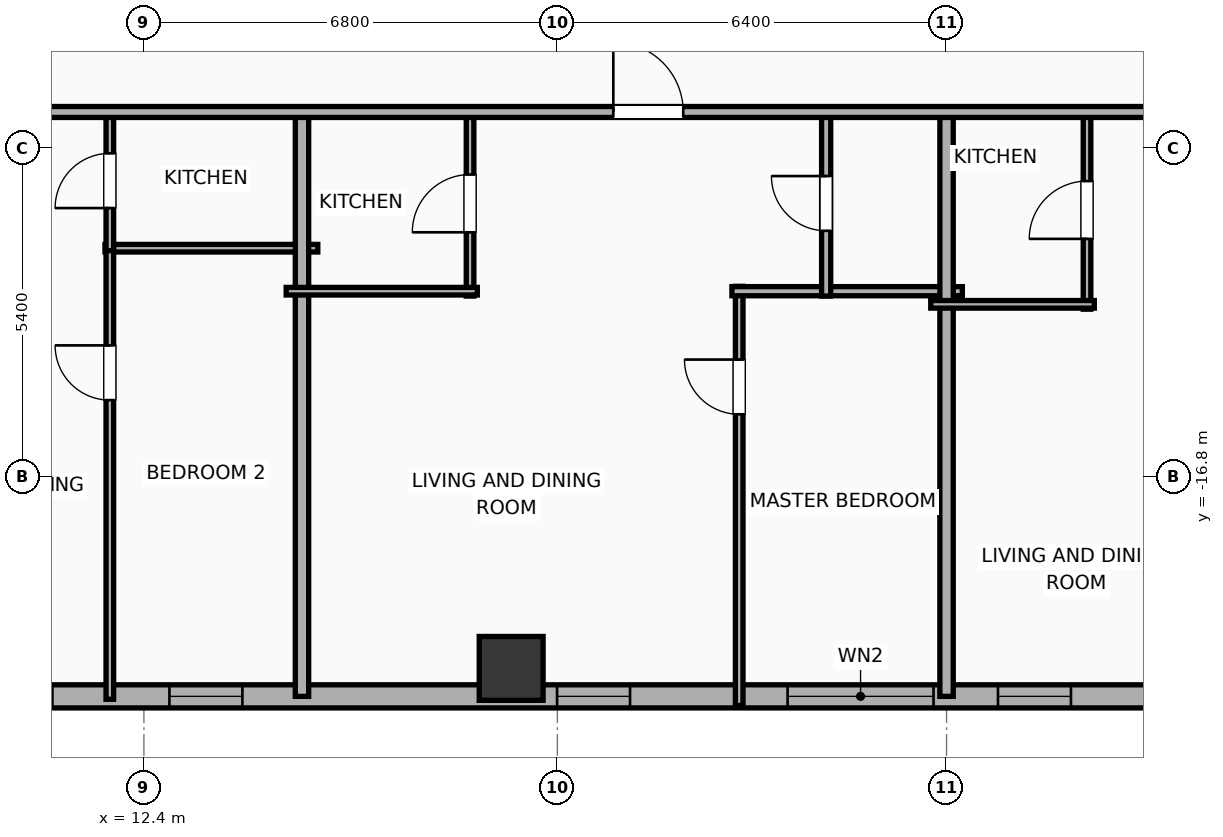
"""IFC4 building model, lengths in metres.
Left out: names, types, materials, properties, quantities, classifications, styles, units other than length and angle.
Written with IfcOpenShell. Run it as: python <this file> out.ifc"""

import sys

from ifc_helpers import new_model, si_unit, direction, frame, frame_2d, origin, origin_2d, place, context, subcontext, project, spatial, rectangle, hollow_rectangle, extrude, element, fill, save


model = new_model("IFC4")
c1 = context("Model", 3, precision=1e-05, world=origin(), true_north=direction((0.0, 1.0)))
c2 = subcontext(c1, "Body", "Model", "MODEL_VIEW")
j1 = project(units=[si_unit("LENGTHUNIT", "METRE"), si_unit("PLANEANGLEUNIT", "RADIAN")], contexts=[c1])
p1 = place(None, origin())
s1 = spatial("IfcSite", under=j1, at=p1, CompositionType="ELEMENT")
p2 = place(p1, origin())
s2 = spatial("IfcBuilding", under=s1, at=p2, CompositionType="ELEMENT")
p3 = place(p2, frame((0.0, 0.0, 132.6)))
s3 = spatial("IfcBuildingStorey", under=s2, at=p3, CompositionType="ELEMENT", Elevation=132.6)
p4 = place(p3, frame((18.44, -19.95, 0.0), z_axis=(0.0, 0.0, 1.0), x_axis=(1.0, 0.0, 0.0)))
e1 = element("IfcColumn", 1, at=p4, inside=s3, PredefinedType="COLUMN", context=c2, shape_type="SweptSolid", body=[
    extrude(hollow_rectangle(XDim=1.05, YDim=1.05, WallThickness=0.036, at=origin_2d()), origin(), (0.0, 0.0, 1.0), 3.9),
])
p5 = place(p3, frame((29.381, -20.41, 0.0), z_axis=(0.0, 0.0, 1.0), x_axis=(-1.0, 0.0, 0.0)))
e2 = element("IfcWall", 2, at=p5, inside=s3, PredefinedType="ELEMENTEDWALL", context=c2, shape_type="SweptSolid", body=[
    extrude(rectangle(XDim=54.763, YDim=0.38, at=frame_2d((27.381, 0.0))), origin(), (0.0, 0.0, 1.0), 3.65),
])
p6 = place(p5, frame((3.995, 0.0, 0.75)))
e3 = element("IfcOpeningElement", 3, at=p6, cuts=e2, PredefinedType="OPENING", context=c2, shape_type="SweptSolid", body=[
    extrude(rectangle(XDim=2.4, YDim=2.1, at=frame_2d((1.2, 1.05))), frame((0.0, 0.2, 0.0), z_axis=(0.0, -1.0, 0.0), x_axis=(1.0, 0.0, 0.0)), (0.0, 0.0, 1.0), 0.4),
])
p7 = place(p5, frame((18.486, 0.0, 0.75)))
e4 = element("IfcOpeningElement", 4, at=p7, cuts=e2, PredefinedType="OPENING", context=c2, shape_type="SweptSolid", body=[
    extrude(rectangle(XDim=2.4, YDim=2.1, at=frame_2d((1.2, 1.05))), frame((0.0, 0.2, 0.0), z_axis=(0.0, -1.0, 0.0), x_axis=(1.0, 0.0, 0.0)), (0.0, 0.0, 1.0), 0.4),
])
p8 = place(p5, frame((46.717, 0.0, 0.75)))
e5 = element("IfcOpeningElement", 5, at=p8, cuts=e2, PredefinedType="OPENING", context=c2, shape_type="SweptSolid", body=[
    extrude(rectangle(XDim=2.4, YDim=2.1, at=frame_2d((1.2, 1.05))), frame((0.0, 0.2, 0.0), z_axis=(0.0, -1.0, 0.0), x_axis=(1.0, 0.0, 0.0)), (0.0, 0.0, 1.0), 0.4),
])
p9 = place(p5, frame((52.651, 0.0, 0.75)))
e6 = element("IfcOpeningElement", 6, at=p9, cuts=e2, PredefinedType="OPENING", context=c2, shape_type="SweptSolid", body=[
    extrude(rectangle(XDim=1.2, YDim=2.05, at=frame_2d((0.6, 1.025))), frame((0.0, 0.2, 0.0), z_axis=(0.0, -1.0, 0.0), x_axis=(1.0, 0.0, 0.0)), (0.0, 0.0, 1.0), 0.4),
])
p10 = place(p5, frame((50.521, 0.0, 0.75)))
e7 = element("IfcOpeningElement", 7, at=p10, cuts=e2, PredefinedType="OPENING", context=c2, shape_type="SweptSolid", body=[
    extrude(rectangle(XDim=1.2, YDim=2.05, at=frame_2d((0.6, 1.025))), frame((0.0, 0.2, 0.0), z_axis=(0.0, -1.0, 0.0), x_axis=(1.0, 0.0, 0.0)), (0.0, 0.0, 1.0), 0.4),
])
p11 = place(p5, frame((40.191, 0.0, 0.75)))
e8 = element("IfcOpeningElement", 8, at=p11, cuts=e2, PredefinedType="OPENING", context=c2, shape_type="SweptSolid", body=[
    extrude(rectangle(XDim=1.2, YDim=2.05, at=frame_2d((0.6, 1.025))), frame((0.0, 0.2, 0.0), z_axis=(0.0, -1.0, 0.0), x_axis=(1.0, 0.0, 0.0)), (0.0, 0.0, 1.0), 0.4),
])
p12 = place(p5, frame((44.631, 0.0, 0.75)))
e9 = element("IfcOpeningElement", 9, at=p12, cuts=e2, PredefinedType="OPENING", context=c2, shape_type="SweptSolid", body=[
    extrude(rectangle(XDim=1.2, YDim=2.05, at=frame_2d((0.6, 1.025))), frame((0.0, 0.2, 0.0), z_axis=(0.0, -1.0, 0.0), x_axis=(1.0, 0.0, 0.0)), (0.0, 0.0, 1.0), 0.4),
])
p13 = place(p5, frame((36.561, 0.0, 0.75)))
e10 = element("IfcOpeningElement", 10, at=p13, cuts=e2, PredefinedType="OPENING", context=c2, shape_type="SweptSolid", body=[
    extrude(rectangle(XDim=1.2, YDim=2.05, at=frame_2d((0.6, 1.025))), frame((0.0, 0.2, 0.0), z_axis=(0.0, -1.0, 0.0), x_axis=(1.0, 0.0, 0.0)), (0.0, 0.0, 1.0), 0.4),
])
p14 = place(p5, frame((30.004, 0.0, 0.75)))
e11 = element("IfcOpeningElement", 11, at=p14, cuts=e2, PredefinedType="OPENING", context=c2, shape_type="SweptSolid", body=[
    extrude(rectangle(XDim=1.2, YDim=2.05, at=frame_2d((0.6, 1.025))), frame((0.0, 0.2, 0.0), z_axis=(0.0, -1.0, 0.0), x_axis=(1.0, 0.0, 0.0)), (0.0, 0.0, 1.0), 0.4),
])
p15 = place(p5, frame((33.599, 0.0, 0.75)))
e12 = element("IfcOpeningElement", 12, at=p15, cuts=e2, PredefinedType="OPENING", context=c2, shape_type="SweptSolid", body=[
    extrude(rectangle(XDim=1.2, YDim=2.05, at=frame_2d((0.6, 1.025))), frame((0.0, 0.2, 0.0), z_axis=(0.0, -1.0, 0.0), x_axis=(1.0, 0.0, 0.0)), (0.0, 0.0, 1.0), 0.4),
])
p16 = place(p5, frame((26.086, 0.0, 0.75)))
e13 = element("IfcOpeningElement", 13, at=p16, cuts=e2, PredefinedType="OPENING", context=c2, shape_type="SweptSolid", body=[
    extrude(rectangle(XDim=1.2, YDim=2.05, at=frame_2d((0.6, 1.025))), frame((0.0, 0.2, 0.0), z_axis=(0.0, -1.0, 0.0), x_axis=(1.0, 0.0, 0.0)), (0.0, 0.0, 1.0), 0.4),
])
p17 = place(p5, frame((22.626, 0.0, 0.75)))
e14 = element("IfcOpeningElement", 14, at=p17, cuts=e2, PredefinedType="OPENING", context=c2, shape_type="SweptSolid", body=[
    extrude(rectangle(XDim=1.2, YDim=2.05, at=frame_2d((0.6, 1.025))), frame((0.0, 0.2, 0.0), z_axis=(0.0, -1.0, 0.0), x_axis=(1.0, 0.0, 0.0)), (0.0, 0.0, 1.0), 0.4),
])
p18 = place(p5, frame((15.361, 0.0, 0.75)))
e15 = element("IfcOpeningElement", 15, at=p18, cuts=e2, PredefinedType="OPENING", context=c2, shape_type="SweptSolid", body=[
    extrude(rectangle(XDim=1.2, YDim=2.05, at=frame_2d((0.6, 1.025))), frame((0.0, 0.2, 0.0), z_axis=(0.0, -1.0, 0.0), x_axis=(1.0, 0.0, 0.0)), (0.0, 0.0, 1.0), 0.4),
])
p19 = place(p5, frame((8.986, 0.0, 0.75)))
e16 = element("IfcOpeningElement", 16, at=p19, cuts=e2, PredefinedType="OPENING", context=c2, shape_type="SweptSolid", body=[
    extrude(rectangle(XDim=1.2, YDim=2.05, at=frame_2d((0.6, 1.025))), frame((0.0, 0.2, 0.0), z_axis=(0.0, -1.0, 0.0), x_axis=(1.0, 0.0, 0.0)), (0.0, 0.0, 1.0), 0.4),
])
p20 = place(p5, frame((1.736, 0.0, 0.75)))
e17 = element("IfcOpeningElement", 17, at=p20, cuts=e2, PredefinedType="OPENING", context=c2, shape_type="SweptSolid", body=[
    extrude(rectangle(XDim=1.2, YDim=2.05, at=frame_2d((0.6, 1.025))), frame((0.0, 0.2, 0.0), z_axis=(0.0, -1.0, 0.0), x_axis=(1.0, 0.0, 0.0)), (0.0, 0.0, 1.0), 0.4),
])
p21 = place(p3, frame((11.76, -13.04, 0.0), z_axis=(0.0, 0.0, 1.0), x_axis=(1.0, 0.0, 0.0)))
e18 = element("IfcWall", 18, at=p21, inside=s3, PredefinedType="PARTITIONING", context=c2, shape_type="SweptSolid", body=[
    extrude(rectangle(XDim=3.5, YDim=0.125, at=frame_2d((1.75, 0.0))), origin(), (0.0, 0.0, 1.0), 3.65),
])
p22 = place(p3, frame((11.84, -20.458, 0.0), z_axis=(0.0, 0.0, 1.0), x_axis=(0.0, 1.0, 0.0)))
e19 = element("IfcWall", 19, at=p22, inside=s3, PredefinedType="PARTITIONING", context=c2, shape_type="SweptSolid", body=[
    extrude(rectangle(XDim=7.458, YDim=0.125, at=frame_2d((3.729, 0.0))), origin(), (0.0, 0.0, 1.0), 3.65),
])
p23 = place(p22, frame((4.919, 0.0, 0.0)))
e20 = element("IfcOpeningElement", 20, at=p23, cuts=e19, PredefinedType="OPENING", context=c2, shape_type="SweptSolid", body=[
    extrude(rectangle(XDim=0.9, YDim=2.05, at=frame_2d((0.45, 1.025))), frame((0.0, 0.073, 0.0), z_axis=(0.0, -1.0, 0.0), x_axis=(1.0, 0.0, 0.0)), (0.0, 0.0, 1.0), 0.145),
])
p24 = place(p3, frame((11.84, -13.08, 0.0), z_axis=(0.0, 0.0, 1.0), x_axis=(0.0, 1.0, 0.0)))
e21 = element("IfcWall", 21, at=p24, inside=s3, PredefinedType="PARTITIONING", context=c2, shape_type="SweptSolid", body=[
    extrude(rectangle(XDim=2.3, YDim=0.125, at=frame_2d((1.15, 0.0))), origin(), (0.0, 0.0, 1.0), 3.65),
])
p25 = place(p24, frame((0.7, 0.0, 0.0)))
e22 = element("IfcOpeningElement", 22, at=p25, cuts=e21, PredefinedType="OPENING", context=c2, shape_type="SweptSolid", body=[
    extrude(rectangle(XDim=0.9, YDim=2.05, at=frame_2d((0.45, 1.025))), frame((0.0, 0.073, 0.0), z_axis=(0.0, -1.0, 0.0), x_axis=(1.0, 0.0, 0.0)), (0.0, 0.0, 1.0), 0.145),
])
p26 = place(p3, frame((15.0, -20.41, 0.0), z_axis=(0.0, 0.0, 1.0), x_axis=(0.0, 1.0, 0.0)))
e23 = element("IfcWall", 23, at=p26, inside=s3, PredefinedType="PARTITIONING", context=c2, shape_type="SweptSolid", body=[
    extrude(rectangle(XDim=9.69, YDim=0.22, at=frame_2d((4.845, 0.0))), origin(), (0.0, 0.0, 1.0), 3.65),
])
p27 = place(p3, frame((22.19, -20.56, 0.0), z_axis=(0.0, 0.0, 1.0), x_axis=(0.0, 1.0, 0.0)))
e24 = element("IfcWall", 24, at=p27, inside=s3, PredefinedType="PARTITIONING", context=c2, shape_type="SweptSolid", body=[
    extrude(rectangle(XDim=6.893, YDim=0.125, at=frame_2d((3.447, 0.0))), origin(), (0.0, 0.0, 1.0), 3.65),
])
p28 = place(p27, frame((4.789, 0.0, 0.0)))
e25 = element("IfcOpeningElement", 25, at=p28, cuts=e24, PredefinedType="OPENING", context=c2, shape_type="SweptSolid", body=[
    extrude(rectangle(XDim=0.9, YDim=2.05, at=frame_2d((0.45, 1.025))), frame((0.0, 0.073, 0.0), z_axis=(0.0, -1.0, 0.0), x_axis=(1.0, 0.0, 0.0)), (0.0, 0.0, 1.0), 0.145),
])
p29 = place(p3, frame((22.07, -13.747, 0.0), z_axis=(0.0, 0.0, 1.0), x_axis=(1.0, 0.0, 0.0)))
e26 = element("IfcWall", 26, at=p29, inside=s3, PredefinedType="PLUMBINGWALL", context=c2, shape_type="SweptSolid", body=[
    extrude(rectangle(XDim=3.79, YDim=0.15, at=frame_2d((1.895, 0.0))), origin(), (0.0, 0.0, 1.0), 3.65),
])
p30 = place(p3, frame((17.764, -13.827, 0.0), z_axis=(0.0, 0.0, 1.0), x_axis=(0.0, 1.0, 0.0)))
e27 = element("IfcWall", 27, at=p30, inside=s3, PredefinedType="PARTITIONING", context=c2, shape_type="SweptSolid", body=[
    extrude(rectangle(XDim=3.047, YDim=0.125, at=frame_2d((1.523, 0.0))), origin(), (0.0, 0.0, 1.0), 3.65),
])
p31 = place(p30, frame((1.049, 0.0, 0.0)))
e28 = element("IfcOpeningElement", 28, at=p31, cuts=e27, PredefinedType="OPENING", context=c2, shape_type="SweptSolid", body=[
    extrude(rectangle(XDim=0.95, YDim=2.05, at=frame_2d((0.475, 1.025))), frame((0.0, 0.073, 0.0), z_axis=(0.0, -1.0, 0.0), x_axis=(1.0, 0.0, 0.0)), (0.0, 0.0, 1.0), 0.145),
])
p32 = place(p3, frame((14.74, -13.747, 0.0), z_axis=(0.0, 0.0, 1.0), x_axis=(1.0, 0.0, 0.0)))
e29 = element("IfcWall", 29, at=p32, inside=s3, PredefinedType="PARTITIONING", context=c2, shape_type="SweptSolid", body=[
    extrude(rectangle(XDim=3.144, YDim=0.125, at=frame_2d((1.572, 0.0))), origin(), (0.0, 0.0, 1.0), 3.65),
])
p33 = place(p3, frame((23.62, -13.827, 0.0), z_axis=(0.0, 0.0, 1.0), x_axis=(0.0, 1.0, 0.0)))
e30 = element("IfcWall", 30, at=p33, inside=s3, PredefinedType="PLUMBINGWALL", context=c2, shape_type="SweptSolid", body=[
    extrude(rectangle(XDim=3.047, YDim=0.15, at=frame_2d((1.523, 0.0))), origin(), (0.0, 0.0, 1.0), 3.65),
])
p34 = place(p33, frame((1.073, 0.0, 0.0)))
e31 = element("IfcOpeningElement", 31, at=p34, cuts=e30, PredefinedType="OPENING", context=c2, shape_type="SweptSolid", body=[
    extrude(rectangle(XDim=0.9, YDim=2.05, at=frame_2d((0.45, 1.025))), frame((0.0, 0.085, 0.0), z_axis=(0.0, -1.0, 0.0), x_axis=(1.0, 0.0, 0.0)), (0.0, 0.0, 1.0), 0.17),
])
p35 = place(p3, frame((25.6, -20.41, 0.0), z_axis=(0.0, 0.0, 1.0), x_axis=(0.0, 1.0, 0.0)))
e32 = element("IfcWall", 32, at=p35, inside=s3, PredefinedType="PARTITIONING", context=c2, shape_type="SweptSolid", body=[
    extrude(rectangle(XDim=9.69, YDim=0.22, at=frame_2d((4.845, 0.0))), origin(), (0.0, 0.0, 1.0), 3.65),
])
p36 = place(p3, frame((27.91, -14.043, 0.0), z_axis=(0.0, 0.0, 1.0), x_axis=(0.0, 1.0, 0.0)))
e33 = element("IfcWall", 33, at=p36, inside=s3, PredefinedType="PARTITIONING", context=c2, shape_type="SweptSolid", body=[
    extrude(rectangle(XDim=3.263, YDim=0.125, at=frame_2d((1.631, 0.0))), origin(), (0.0, 0.0, 1.0), 3.65),
])
p37 = place(p36, frame((1.156, 0.0, 0.0)))
e34 = element("IfcOpeningElement", 34, at=p37, cuts=e33, PredefinedType="OPENING", context=c2, shape_type="SweptSolid", body=[
    extrude(rectangle(XDim=0.95, YDim=2.05, at=frame_2d((0.475, 1.025))), frame((0.0, 0.073, 0.0), z_axis=(0.0, -1.0, 0.0), x_axis=(1.0, 0.0, 0.0)), (0.0, 0.0, 1.0), 0.145),
])
p38 = place(p3, frame((25.34, -13.963, 0.0), z_axis=(0.0, 0.0, 1.0), x_axis=(1.0, 0.0, 0.0)))
e35 = element("IfcWall", 35, at=p38, inside=s3, PredefinedType="PARTITIONING", context=c2, shape_type="SweptSolid", body=[
    extrude(rectangle(XDim=2.69, YDim=0.125, at=frame_2d((1.345, 0.0))), origin(), (0.0, 0.0, 1.0), 3.65),
])
p39 = place(p3, frame((-29.21, -10.8, 0.0), z_axis=(0.0, 0.0, 1.0), x_axis=(1.0, 0.0, 0.0)))
e36 = element("IfcWall", 36, at=p39, inside=s3, PredefinedType="PARTITIONING", context=c2, shape_type="SweptSolid", body=[
    extrude(rectangle(XDim=62.42, YDim=0.18, at=frame_2d((31.21, 0.0))), origin(), (0.0, 0.0, 1.0), 3.65),
])
p40 = place(p39, frame((2.74, 0.0, 0.0)))
e37 = element("IfcOpeningElement", 37, at=p40, cuts=e36, PredefinedType="OPENING", context=c2, shape_type="SweptSolid", body=[
    extrude(rectangle(XDim=0.9, YDim=2.05, at=frame_2d((0.45, 1.025))), frame((0.0, 0.1, 0.0), z_axis=(0.0, -1.0, 0.0), x_axis=(1.0, 0.0, 0.0)), (0.0, 0.0, 1.0), 0.2),
])
p41 = place(p39, frame((9.968, 0.0, 0.0)))
e38 = element("IfcOpeningElement", 38, at=p41, cuts=e36, PredefinedType="OPENING", context=c2, shape_type="SweptSolid", body=[
    extrude(rectangle(XDim=1.15, YDim=2.05, at=frame_2d((0.575, 1.025))), frame((0.0, 0.1, 0.0), z_axis=(0.0, -1.0, 0.0), x_axis=(1.0, 0.0, 0.0)), (0.0, 0.0, 1.0), 0.2),
])
p42 = place(p39, frame((17.227, 0.0, 0.0)))
e39 = element("IfcOpeningElement", 39, at=p42, cuts=e36, PredefinedType="OPENING", context=c2, shape_type="SweptSolid", body=[
    extrude(rectangle(XDim=1.15, YDim=2.05, at=frame_2d((0.575, 1.025))), frame((0.0, 0.1, 0.0), z_axis=(0.0, -1.0, 0.0), x_axis=(1.0, 0.0, 0.0)), (0.0, 0.0, 1.0), 0.2),
])
p43 = place(p39, frame((28.157, 0.0, 0.0)))
e40 = element("IfcOpeningElement", 40, at=p43, cuts=e36, PredefinedType="OPENING", context=c2, shape_type="SweptSolid", body=[
    extrude(rectangle(XDim=1.15, YDim=2.05, at=frame_2d((0.575, 1.025))), frame((0.0, 0.1, 0.0), z_axis=(0.0, -1.0, 0.0), x_axis=(1.0, 0.0, 0.0)), (0.0, 0.0, 1.0), 0.2),
])
p44 = place(p39, frame((38.512, 0.0, 0.0)))
e41 = element("IfcOpeningElement", 41, at=p44, cuts=e36, PredefinedType="OPENING", context=c2, shape_type="SweptSolid", body=[
    extrude(rectangle(XDim=1.15, YDim=2.05, at=frame_2d((0.575, 1.025))), frame((0.0, 0.1, 0.0), z_axis=(0.0, -1.0, 0.0), x_axis=(1.0, 0.0, 0.0)), (0.0, 0.0, 1.0), 0.2),
])
p45 = place(p39, frame((49.33, 0.0, 0.0)))
e42 = element("IfcOpeningElement", 42, at=p45, cuts=e36, PredefinedType="OPENING", context=c2, shape_type="SweptSolid", body=[
    extrude(rectangle(XDim=1.15, YDim=2.05, at=frame_2d((0.575, 1.025))), frame((0.0, 0.1, 0.0), z_axis=(0.0, -1.0, 0.0), x_axis=(1.0, 0.0, 0.0)), (0.0, 0.0, 1.0), 0.2),
])
p46 = place(p39, frame((58.237, 0.0, 0.0)))
e43 = element("IfcOpeningElement", 43, at=p46, cuts=e36, PredefinedType="OPENING", context=c2, shape_type="SweptSolid", body=[
    extrude(rectangle(XDim=1.15, YDim=2.05, at=frame_2d((0.575, 1.025))), frame((0.0, 0.1, 0.0), z_axis=(0.0, -1.0, 0.0), x_axis=(1.0, 0.0, 0.0)), (0.0, 0.0, 1.0), 0.2),
])
p47 = place(p6, origin())
e44 = element("IfcWindow", 44, at=p47, inside=s3, PartitioningType="SINGLE_PANEL", PredefinedType="WINDOW", context=c2, shape_type="SweptSolid", body=[
    extrude(rectangle(XDim=2.4, YDim=2.1, at=frame_2d((1.2, 1.05))), frame((0.0, 0.03, 0.0), z_axis=(0.0, -1.0, 0.0), x_axis=(1.0, 0.0, 0.0)), (0.0, 0.0, 1.0), 0.06),
])
fill(e3, e44)
p48 = place(p18, origin())
e45 = element("IfcWindow", 45, at=p48, inside=s3, PartitioningType="SINGLE_PANEL", PredefinedType="WINDOW", context=c2, shape_type="SweptSolid", body=[
    extrude(rectangle(XDim=1.2, YDim=2.05, at=frame_2d((0.6, 1.025))), frame((0.0, 0.03, 0.0), z_axis=(0.0, -1.0, 0.0), x_axis=(1.0, 0.0, 0.0)), (0.0, 0.0, 1.0), 0.06),
])
fill(e15, e45)
p49 = place(p19, origin())
e46 = element("IfcWindow", 46, at=p49, inside=s3, PartitioningType="SINGLE_PANEL", PredefinedType="WINDOW", context=c2, shape_type="SweptSolid", body=[
    extrude(rectangle(XDim=1.2, YDim=2.05, at=frame_2d((0.6, 1.025))), frame((0.0, 0.03, 0.0), z_axis=(0.0, -1.0, 0.0), x_axis=(1.0, 0.0, 0.0)), (0.0, 0.0, 1.0), 0.06),
])
fill(e16, e46)
p50 = place(p20, origin())
e47 = element("IfcWindow", 47, at=p50, inside=s3, PartitioningType="SINGLE_PANEL", PredefinedType="WINDOW", context=c2, shape_type="SweptSolid", body=[
    extrude(rectangle(XDim=1.2, YDim=2.05, at=frame_2d((0.6, 1.025))), frame((0.0, 0.03, 0.0), z_axis=(0.0, -1.0, 0.0), x_axis=(1.0, 0.0, 0.0)), (0.0, 0.0, 1.0), 0.06),
])
fill(e17, e47)
p51 = place(p23, origin())
e48 = element("IfcDoor", 48, at=p51, inside=s3, OperationType="SINGLE_SWING_RIGHT", PredefinedType="DOOR", context=c2, shape_type="SweptSolid", body=[
    extrude(rectangle(XDim=0.9, YDim=2.05, at=frame_2d((0.45, 1.025))), frame((0.0, 0.025, 0.0), z_axis=(0.0, -1.0, 0.0), x_axis=(1.0, 0.0, 0.0)), (0.0, 0.0, 1.0), 0.05),
])
fill(e20, e48)
p52 = place(p25, origin())
e49 = element("IfcDoor", 49, at=p52, inside=s3, OperationType="SINGLE_SWING_LEFT", PredefinedType="DOOR", context=c2, shape_type="SweptSolid", body=[
    extrude(rectangle(XDim=0.9, YDim=2.05, at=frame_2d((0.45, 1.025))), frame((0.0, 0.025, 0.0), z_axis=(0.0, -1.0, 0.0), x_axis=(1.0, 0.0, 0.0)), (0.0, 0.0, 1.0), 0.05),
])
fill(e22, e49)
p53 = place(p28, origin())
e50 = element("IfcDoor", 50, at=p53, inside=s3, OperationType="SINGLE_SWING_RIGHT", PredefinedType="DOOR", context=c2, shape_type="SweptSolid", body=[
    extrude(rectangle(XDim=0.9, YDim=2.05, at=frame_2d((0.45, 1.025))), frame((0.0, 0.025, 0.0), z_axis=(0.0, -1.0, 0.0), x_axis=(1.0, 0.0, 0.0)), (0.0, 0.0, 1.0), 0.05),
])
fill(e25, e50)
p54 = place(p31, origin())
e51 = element("IfcDoor", 51, at=p54, inside=s3, OperationType="SINGLE_SWING_LEFT", PredefinedType="DOOR", context=c2, shape_type="SweptSolid", body=[
    extrude(rectangle(XDim=0.95, YDim=2.05, at=frame_2d((0.475, 1.025))), frame((0.0, 0.025, 0.0), z_axis=(0.0, -1.0, 0.0), x_axis=(1.0, 0.0, 0.0)), (0.0, 0.0, 1.0), 0.05),
])
fill(e28, e51)
p55 = place(p34, origin())
e52 = element("IfcDoor", 52, at=p55, inside=s3, OperationType="SINGLE_SWING_RIGHT", PredefinedType="DOOR", context=c2, shape_type="SweptSolid", body=[
    extrude(rectangle(XDim=0.9, YDim=2.05, at=frame_2d((0.45, 1.025))), frame((0.0, 0.025, 0.0), z_axis=(0.0, -1.0, 0.0), x_axis=(1.0, 0.0, 0.0)), (0.0, 0.0, 1.0), 0.05),
])
fill(e31, e52)
p56 = place(p37, origin())
e53 = element("IfcDoor", 53, at=p56, inside=s3, OperationType="SINGLE_SWING_LEFT", PredefinedType="DOOR", context=c2, shape_type="SweptSolid", body=[
    extrude(rectangle(XDim=0.95, YDim=2.05, at=frame_2d((0.475, 1.025))), frame((0.0, 0.025, 0.0), z_axis=(0.0, -1.0, 0.0), x_axis=(1.0, 0.0, 0.0)), (0.0, 0.0, 1.0), 0.05),
])
fill(e34, e53)
p57 = place(p45, origin())
e54 = element("IfcDoor", 54, at=p57, inside=s3, OperationType="SINGLE_SWING_LEFT", PredefinedType="DOOR", context=c2, shape_type="SweptSolid", body=[
    extrude(rectangle(XDim=1.15, YDim=2.05, at=frame_2d((0.575, 1.025))), frame((0.0, 0.025, 0.0), z_axis=(0.0, -1.0, 0.0), x_axis=(1.0, 0.0, 0.0)), (0.0, 0.0, 1.0), 0.05),
])
fill(e42, e54)
save(model, sys.argv[1])
